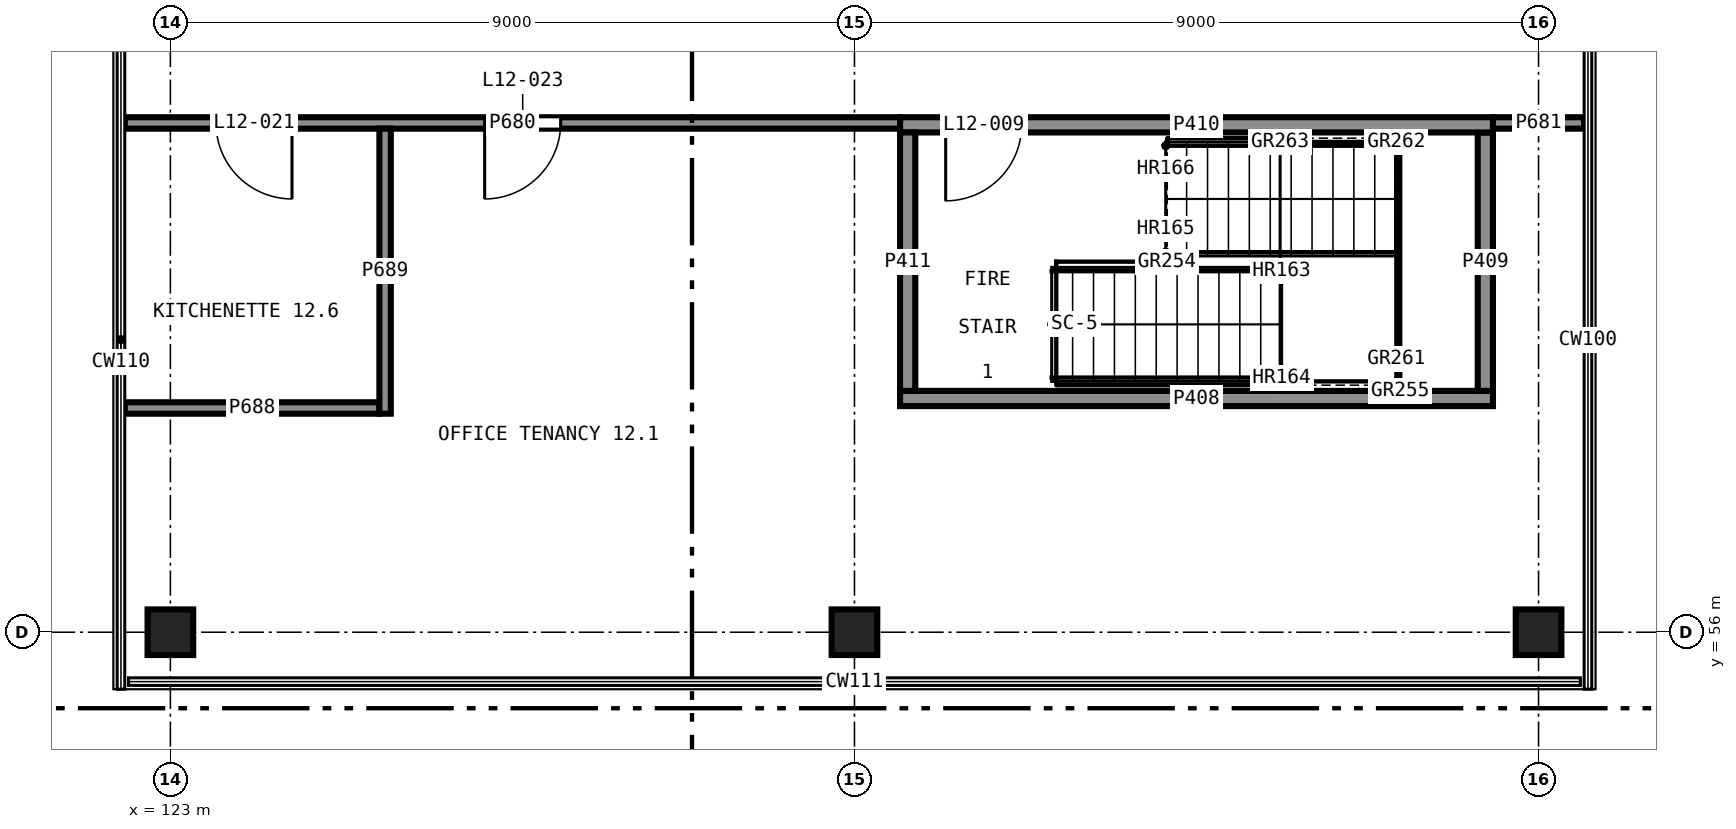
"""IFC4 building model, lengths in metres.
Left out: names, types, materials, properties, quantities, classifications, styles, units other than length and angle.
Written with IfcOpenShell. Run it as: python <this file> out.ifc"""

import sys

from ifc_helpers import new_model, si_unit, direction, frame, frame_2d, origin, origin_2d, place, context, subcontext, project, spatial, rectangle, extrude, element, fill, save


model = new_model("IFC4")
c1 = context("Model", 3, precision=1e-05, world=origin(), true_north=direction((0.0, 1.0)))
c2 = subcontext(c1, "Body", "Model", "MODEL_VIEW")
j1 = project(units=[si_unit("LENGTHUNIT", "METRE"), si_unit("PLANEANGLEUNIT", "RADIAN")], contexts=[c1])
p1 = place(None, origin())
s1 = spatial("IfcSite", under=j1, at=p1, CompositionType="ELEMENT")
p2 = place(p1, origin())
s2 = spatial("IfcBuilding", under=s1, at=p2, CompositionType="ELEMENT")
p3 = place(p2, frame((0.0, 0.0, 49.5)))
s3 = spatial("IfcBuildingStorey", under=s2, at=p3, CompositionType="ELEMENT", Elevation=49.5)
for number, where, z_axis, x_axis in (
    (1, (123.0, 56.0, 0.0), (0.0, 0.0, 1.0), (1.0, 0.0, 0.0)),
    (2, (132.0, 56.0, 0.0), (0.0, 0.0, 1.0), (1.0, 0.0, 0.0)),
    (3, (141.0, 56.0, 0.0), (0.0, 0.0, 1.0), (1.0, 0.0, 0.0)),
):
    element("IfcColumn", number, at=place(p3, frame(where, z_axis=z_axis, x_axis=x_axis)), inside=s3, PredefinedType="COLUMN", context=c2, shape_type="SweptSolid", body=[
        extrude(rectangle(XDim=0.6, YDim=0.6, at=origin_2d()), origin(), (0.0, 0.0, 1.0), 4.0),
    ])
p4 = place(p3, frame((132.6, 59.075, 0.0), z_axis=(0.0, 0.0, 1.0), x_axis=(1.0, 0.0, 0.0)))
e4 = element("IfcWall", 4, at=p4, inside=s3, PredefinedType="SHEAR", context=c2, shape_type="SweptSolid", body=[
    extrude(rectangle(XDim=7.8, YDim=0.2, at=frame_2d((3.9, 0.0))), origin(), (0.0, 0.0, 1.0), 3.58),
])
p5 = place(p3, frame((140.3, 59.175, 0.0), z_axis=(0.0, 0.0, 1.0), x_axis=(0.0, 1.0, 0.0)))
e5 = element("IfcWall", 5, at=p5, inside=s3, PredefinedType="SHEAR", context=c2, shape_type="SweptSolid", body=[
    extrude(rectangle(XDim=3.4, YDim=0.2, at=frame_2d((1.7, 0.0))), origin(), (0.0, 0.0, 1.0), 3.58),
])
p6 = place(p3, frame((140.4, 62.675, 0.0), z_axis=(0.0, 0.0, 1.0), x_axis=(-1.0, 0.0, 0.0)))
e6 = element("IfcWall", 6, at=p6, inside=s3, PredefinedType="SHEAR", context=c2, shape_type="SweptSolid", body=[
    extrude(rectangle(XDim=7.8, YDim=0.2, at=frame_2d((3.9, 0.0))), origin(), (0.0, 0.0, 1.0), 3.58),
])
p7 = place(p6, frame((6.2, 0.0, 0.0)))
e7 = element("IfcOpeningElement", 7, at=p7, cuts=e6, PredefinedType="OPENING", context=c2, shape_type="SweptSolid", body=[
    extrude(rectangle(XDim=1.0, YDim=2.1, at=frame_2d((0.5, 1.05))), frame((0.0, 0.11, 0.0), z_axis=(0.0, -1.0, 0.0), x_axis=(1.0, 0.0, 0.0)), (0.0, 0.0, 1.0), 0.22),
])
p8 = place(p3, frame((132.7, 62.575, 0.0), z_axis=(0.0, 0.0, 1.0), x_axis=(0.0, -1.0, 0.0)))
e8 = element("IfcWall", 8, at=p8, inside=s3, PredefinedType="SHEAR", context=c2, shape_type="SweptSolid", body=[
    extrude(rectangle(XDim=3.4, YDim=0.2, at=frame_2d((1.7, 0.0))), origin(), (0.0, 0.0, 1.0), 3.58),
])
p9 = place(p3, frame((132.6, 62.7, 0.0), z_axis=(0.0, 0.0, 1.0), x_axis=(-1.0, 0.0, 0.0)))
e9 = element("IfcWall", 9, at=p9, inside=s3, PredefinedType="PARTITIONING", context=c2, shape_type="SweptSolid", body=[
    extrude(rectangle(XDim=10.2, YDim=0.15, at=frame_2d((5.1, 0.0))), origin(), (0.0, 0.0, 1.0), 3.58),
])
p10 = place(p9, frame((8.0, 0.0, 0.0)))
e10 = element("IfcOpeningElement", 10, at=p10, cuts=e9, PredefinedType="OPENING", context=c2, shape_type="SweptSolid", body=[
    extrude(rectangle(XDim=1.0, YDim=2.1, at=frame_2d((0.5, 1.05))), frame((0.0, 0.085, 0.0), z_axis=(0.0, -1.0, 0.0), x_axis=(1.0, 0.0, 0.0)), (0.0, 0.0, 1.0), 0.17),
])
p11 = place(p9, frame((4.465, 0.0, 0.0)))
e11 = element("IfcOpeningElement", 11, at=p11, cuts=e9, PredefinedType="OPENING", context=c2, shape_type="SweptSolid", body=[
    extrude(rectangle(XDim=1.0, YDim=2.1, at=frame_2d((0.5, 1.05))), frame((0.0, 0.085, 0.0), z_axis=(0.0, -1.0, 0.0), x_axis=(1.0, 0.0, 0.0)), (0.0, 0.0, 1.0), 0.17),
])
p12 = place(p3, frame((141.6, 62.7, 0.0), z_axis=(0.0, 0.0, 1.0), x_axis=(-1.0, 0.0, 0.0)))
e12 = element("IfcWall", 12, at=p12, inside=s3, PredefinedType="PARTITIONING", context=c2, shape_type="SweptSolid", body=[
    extrude(rectangle(XDim=1.2, YDim=0.15, at=frame_2d((0.6, 0.0))), origin(), (0.0, 0.0, 1.0), 3.58),
])
p13 = place(p3, frame((122.4, 58.95, 0.0), z_axis=(0.0, 0.0, 1.0), x_axis=(1.0, 0.0, 0.0)))
e13 = element("IfcWall", 13, at=p13, inside=s3, PredefinedType="PARTITIONING", context=c2, shape_type="SweptSolid", body=[
    extrude(rectangle(XDim=3.35, YDim=0.15, at=frame_2d((1.675, 0.0))), origin(), (0.0, 0.0, 1.0), 3.58),
])
p14 = place(p3, frame((125.825, 62.625, 0.0), z_axis=(0.0, 0.0, 1.0), x_axis=(0.0, -1.0, 0.0)))
e14 = element("IfcWall", 14, at=p14, inside=s3, PredefinedType="PARTITIONING", context=c2, shape_type="SweptSolid", body=[
    extrude(rectangle(XDim=3.75, YDim=0.15, at=frame_2d((1.875, 0.0))), origin(), (0.0, 0.0, 1.0), 3.58),
])
p15 = place(p7, origin())
e15 = element("IfcDoor", 15, at=p15, inside=s3, OperationType="SINGLE_SWING_LEFT", PredefinedType="DOOR", context=c2, shape_type="SweptSolid", body=[
    extrude(rectangle(XDim=1.0, YDim=2.1, at=frame_2d((0.5, 1.05))), frame((0.0, 0.025, 0.0), z_axis=(0.0, -1.0, 0.0), x_axis=(1.0, 0.0, 0.0)), (0.0, 0.0, 1.0), 0.05),
])
fill(e7, e15)
p16 = place(p10, origin())
e16 = element("IfcDoor", 16, at=p16, inside=s3, OperationType="SINGLE_SWING_RIGHT", PredefinedType="DOOR", context=c2, shape_type="SweptSolid", body=[
    extrude(rectangle(XDim=1.0, YDim=2.1, at=frame_2d((0.5, 1.05))), frame((0.0, 0.025, 0.0), z_axis=(0.0, -1.0, 0.0), x_axis=(1.0, 0.0, 0.0)), (0.0, 0.0, 1.0), 0.05),
])
fill(e10, e16)
p17 = place(p11, origin())
e17 = element("IfcDoor", 17, at=p17, inside=s3, OperationType="SINGLE_SWING_LEFT", PredefinedType="DOOR", context=c2, shape_type="SweptSolid", body=[
    extrude(rectangle(XDim=1.0, YDim=2.1, at=frame_2d((0.5, 1.05))), frame((0.0, 0.025, 0.0), z_axis=(0.0, -1.0, 0.0), x_axis=(1.0, 0.0, 0.0)), (0.0, 0.0, 1.0), 0.05),
])
fill(e11, e17)
save(model, sys.argv[1])
